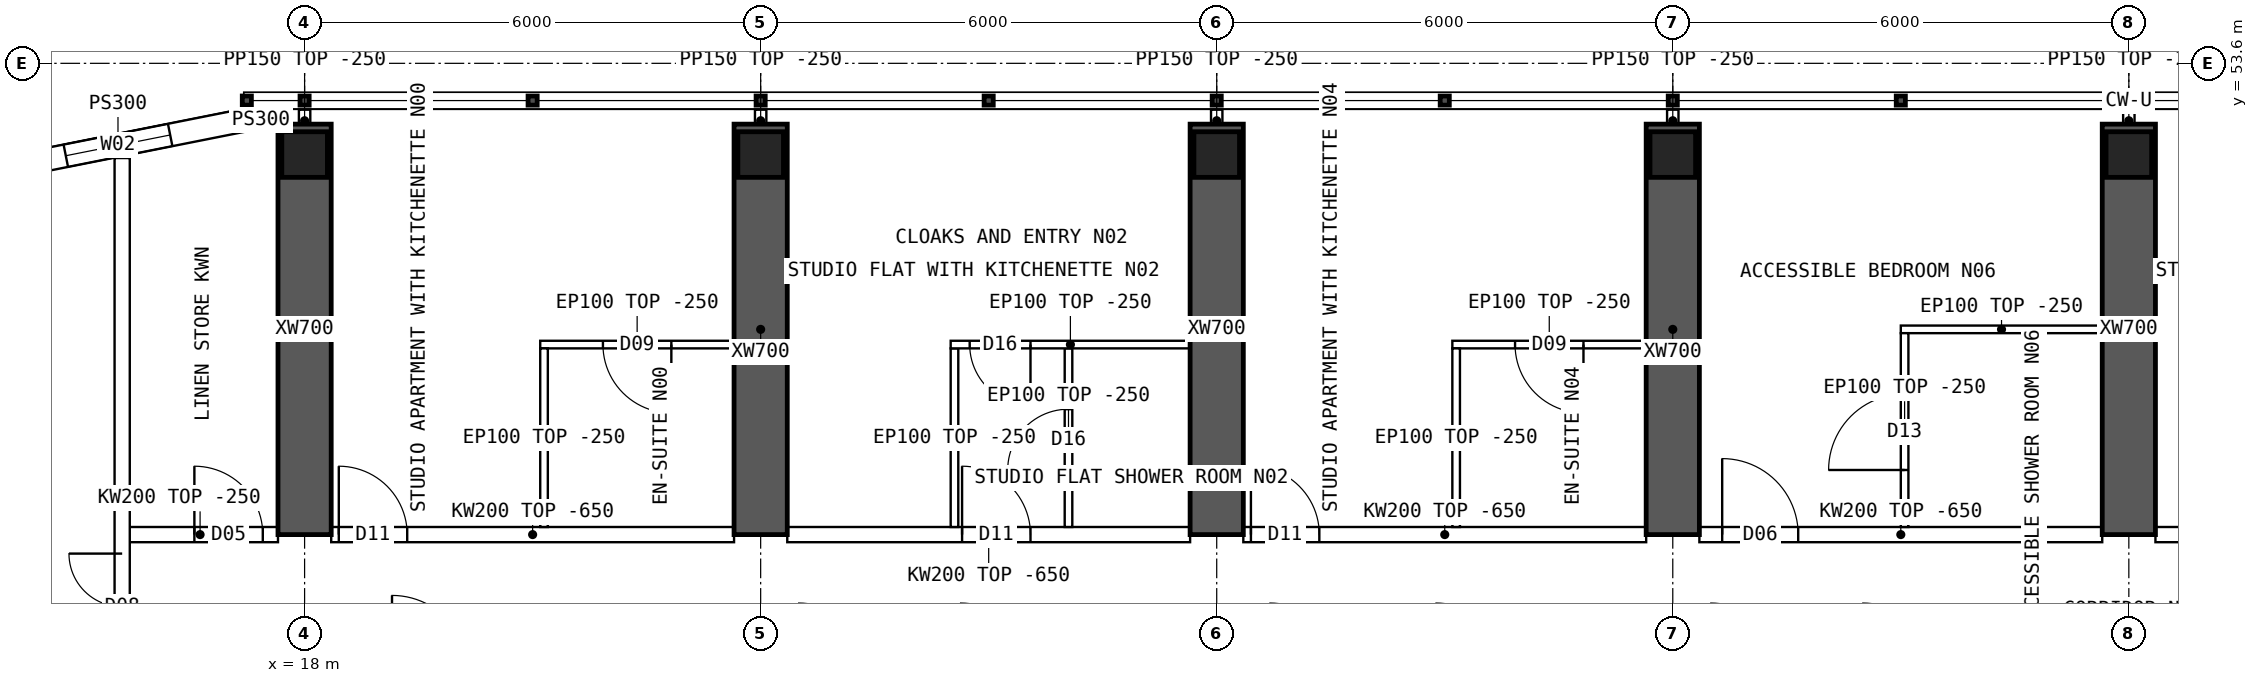
"""IFC4 building model, lengths in metres.
Left out: names, types, materials, properties, quantities, classifications, styles, units other than length and angle.
Written with IfcOpenShell. Run it as: python <this file> out.ifc"""

import sys

from ifc_helpers import new_model, si_unit, direction, frame, frame_2d, origin, origin_2d, place, context, subcontext, project, spatial, polyline, rectangle, hollow_rectangle, outline, extrude, element, fill, save


model = new_model("IFC4")
c1 = context("Model", 3, precision=1e-05, world=origin(), true_north=direction((0.0, 1.0)))
c2 = subcontext(c1, "Body", "Model", "MODEL_VIEW")
j1 = project(units=[si_unit("LENGTHUNIT", "METRE"), si_unit("PLANEANGLEUNIT", "RADIAN")], contexts=[c1])
p1 = place(None, origin())
s1 = spatial("IfcSite", under=j1, at=p1, CompositionType="ELEMENT")
p2 = place(p1, origin())
s2 = spatial("IfcBuilding", under=s1, at=p2, CompositionType="ELEMENT")
p3 = place(p2, frame((0.0, 0.0, 220.3)))
s3 = spatial("IfcBuildingStorey", under=s2, at=p3, CompositionType="ELEMENT", Elevation=220.3)
for number, where, z_axis, x_axis in (
    (1, (18.0, 52.4, 0.0), (0.0, 0.0, 1.0), (1.0, 0.0, 0.0)),
    (2, (24.0, 52.4, 0.0), (0.0, 0.0, 1.0), (1.0, 0.0, 0.0)),
    (3, (30.0, 52.4, 0.0), (0.0, 0.0, 1.0), (1.0, 0.0, 0.0)),
    (4, (36.0, 52.4, 0.0), (0.0, 0.0, 1.0), (1.0, 0.0, 0.0)),
    (5, (42.0, 52.4, 0.0), (0.0, 0.0, 1.0), (1.0, 0.0, 0.0)),
):
    element("IfcColumn", number, at=place(p3, frame(where, z_axis=z_axis, x_axis=x_axis)), inside=s3, PredefinedType="COLUMN", context=c2, shape_type="SweptSolid", body=[
        extrude(hollow_rectangle(XDim=0.6, YDim=0.6, WallThickness=0.06, at=origin_2d()), origin(), (0.0, 0.0, 1.0), 3.75),
    ])
for number, where, z_axis, x_axis in (
    (6, (18.0, 47.4, 0.0), (0.0, 0.0, 1.0), (0.0, 1.0, 0.0)),
    (7, (24.0, 47.4, 0.0), (0.0, 0.0, 1.0), (0.0, 1.0, 0.0)),
    (8, (30.0, 47.4, 0.0), (0.0, 0.0, 1.0), (0.0, 1.0, 0.0)),
    (9, (36.0, 47.4, 0.0), (0.0, 0.0, 1.0), (0.0, 1.0, 0.0)),
    (10, (42.0, 47.4, 0.0), (0.0, 0.0, 1.0), (0.0, 1.0, 0.0)),
):
    element("IfcWall", number, at=place(p3, frame(where, z_axis=z_axis, x_axis=x_axis)), inside=s3, PredefinedType="SHEAR", context=c2, shape_type="SweptSolid", body=[
        extrude(rectangle(XDim=5.4, YDim=0.7, at=frame_2d((2.7, 0.0))), origin(), (0.0, 0.0, 1.0), 3.75),
    ])
p4 = place(p3, frame((17.2, 52.85, 0.0), z_axis=(0.0, 0.0, 1.0), x_axis=(-0.98078325777, -0.195100490205, 0.0)))
e11 = element("IfcWall", 11, at=p4, inside=s3, PredefinedType="SOLIDWALL", context=c2, shape_type="SweptSolid", body=[
    extrude(outline(polyline([(-0.03, -0.15), (3.405, -0.15), (3.345, 0.15), (0.03, 0.15), (-0.03, -0.15)])), origin(), (0.0, 0.0, 1.0), 3.5),
])
p5 = place(p4, frame((0.988, 0.0, 0.9)))
e12 = element("IfcOpeningElement", 12, at=p5, cuts=e11, PredefinedType="OPENING", context=c2, shape_type="SweptSolid", body=[
    extrude(rectangle(XDim=1.4, YDim=1.8, at=frame_2d((0.7, 0.9))), frame((0.0, 0.16, 0.0), z_axis=(0.0, -1.0, 0.0), x_axis=(1.0, 0.0, 0.0)), (0.0, 0.0, 1.0), 0.32),
])
p6 = place(p3, frame((17.2, 52.85, 0.0), z_axis=(0.0, 0.0, 1.0), x_axis=(1.0, 0.0, 0.0)))
e13 = element("IfcWall", 13, at=p6, inside=s3, PredefinedType="SOLIDWALL", context=c2, shape_type="SweptSolid", body=[
    extrude(rectangle(XDim=0.45, YDim=0.3, at=frame_2d((0.225, 0.0))), origin(), (0.0, 0.0, 1.0), 3.5),
])
p7 = place(p3, frame((15.6, 47.4, 0.0), z_axis=(0.0, 0.0, 1.0), x_axis=(1.0, 0.0, 0.0)))
e14 = element("IfcWall", 14, at=p7, inside=s3, PredefinedType="SOLIDWALL", context=c2, shape_type="SweptSolid", body=[
    extrude(rectangle(XDim=2.05, YDim=0.2, at=frame_2d((1.025, 0.0))), origin(), (0.0, 0.0, 1.0), 3.5),
])
p8 = place(p7, frame((0.95, 0.0, 0.0)))
e15 = element("IfcOpeningElement", 15, at=p8, cuts=e14, PredefinedType="OPENING", context=c2, shape_type="SweptSolid", body=[
    extrude(rectangle(XDim=0.9, YDim=2.1, at=frame_2d((0.45, 1.05))), frame((0.0, 0.11, 0.0), z_axis=(0.0, -1.0, 0.0), x_axis=(1.0, 0.0, 0.0)), (0.0, 0.0, 1.0), 0.22),
])
p9 = place(p3, frame((18.35, 47.4, 0.0), z_axis=(0.0, 0.0, 1.0), x_axis=(1.0, 0.0, 0.0)))
e16 = element("IfcWall", 16, at=p9, inside=s3, PredefinedType="SOLIDWALL", context=c2, shape_type="SweptSolid", body=[
    extrude(outline(polyline([(0.0, 0.0), (5.3, 0.0), (5.3, 3.1), (0.0, 3.1), (0.0, 0.0)])), frame((0.0, 0.1, 0.0), z_axis=(0.0, -1.0, 0.0), x_axis=(1.0, 0.0, 0.0)), (0.0, 0.0, 1.0), 0.2),
])
p10 = place(p9, frame((0.1, 0.0, 0.0)))
e17 = element("IfcOpeningElement", 17, at=p10, cuts=e16, PredefinedType="OPENING", context=c2, shape_type="SweptSolid", body=[
    extrude(rectangle(XDim=0.9, YDim=2.1, at=frame_2d((0.45, 1.05))), frame((0.0, 0.11, 0.0), z_axis=(0.0, -1.0, 0.0), x_axis=(1.0, 0.0, 0.0)), (0.0, 0.0, 1.0), 0.22),
])
p11 = place(p3, frame((24.35, 47.4, 0.0), z_axis=(0.0, 0.0, 1.0), x_axis=(1.0, 0.0, 0.0)))
e18 = element("IfcWall", 18, at=p11, inside=s3, PredefinedType="SOLIDWALL", context=c2, shape_type="SweptSolid", body=[
    extrude(outline(polyline([(0.0, 0.0), (5.3, 0.0), (5.3, 3.1), (0.0, 3.1), (0.0, 0.0)])), frame((0.0, 0.1, 0.0), z_axis=(0.0, -1.0, 0.0), x_axis=(1.0, 0.0, 0.0)), (0.0, 0.0, 1.0), 0.2),
])
p12 = place(p11, frame((2.3, 0.0, 0.0)))
e19 = element("IfcOpeningElement", 19, at=p12, cuts=e18, PredefinedType="OPENING", context=c2, shape_type="SweptSolid", body=[
    extrude(rectangle(XDim=0.9, YDim=2.1, at=frame_2d((0.45, 1.05))), frame((0.0, 0.11, 0.0), z_axis=(0.0, -1.0, 0.0), x_axis=(1.0, 0.0, 0.0)), (0.0, 0.0, 1.0), 0.22),
])
p13 = place(p3, frame((30.35, 47.4, 0.0), z_axis=(0.0, 0.0, 1.0), x_axis=(1.0, 0.0, 0.0)))
e20 = element("IfcWall", 20, at=p13, inside=s3, PredefinedType="SOLIDWALL", context=c2, shape_type="SweptSolid", body=[
    extrude(outline(polyline([(0.0, 0.0), (5.3, 0.0), (5.3, 3.1), (0.0, 3.1), (0.0, 0.0)])), frame((0.0, 0.1, 0.0), z_axis=(0.0, -1.0, 0.0), x_axis=(1.0, 0.0, 0.0)), (0.0, 0.0, 1.0), 0.2),
])
p14 = place(p13, frame((0.1, 0.0, 0.0)))
e21 = element("IfcOpeningElement", 21, at=p14, cuts=e20, PredefinedType="OPENING", context=c2, shape_type="SweptSolid", body=[
    extrude(rectangle(XDim=0.9, YDim=2.1, at=frame_2d((0.45, 1.05))), frame((0.0, 0.11, 0.0), z_axis=(0.0, -1.0, 0.0), x_axis=(1.0, 0.0, 0.0)), (0.0, 0.0, 1.0), 0.22),
])
p15 = place(p3, frame((36.35, 47.4, 0.0), z_axis=(0.0, 0.0, 1.0), x_axis=(1.0, 0.0, 0.0)))
e22 = element("IfcWall", 22, at=p15, inside=s3, PredefinedType="SOLIDWALL", context=c2, shape_type="SweptSolid", body=[
    extrude(outline(polyline([(0.0, 0.0), (5.3, 0.0), (5.3, 3.1), (0.0, 3.1), (0.0, 0.0)])), frame((0.0, 0.1, 0.0), z_axis=(0.0, -1.0, 0.0), x_axis=(1.0, 0.0, 0.0)), (0.0, 0.0, 1.0), 0.2),
])
p16 = place(p15, frame((0.3, 0.0, 0.0)))
e23 = element("IfcOpeningElement", 23, at=p16, cuts=e22, PredefinedType="OPENING", context=c2, shape_type="SweptSolid", body=[
    extrude(rectangle(XDim=1.0, YDim=2.1, at=frame_2d((0.5, 1.05))), frame((0.0, 0.11, 0.0), z_axis=(0.0, -1.0, 0.0), x_axis=(1.0, 0.0, 0.0)), (0.0, 0.0, 1.0), 0.22),
])
p17 = place(p3, frame((42.35, 47.4, 0.0), z_axis=(0.0, 0.0, 1.0), x_axis=(1.0, 0.0, 0.0)))
e24 = element("IfcWall", 24, at=p17, inside=s3, PredefinedType="SOLIDWALL", context=c2, shape_type="SweptSolid", body=[
    extrude(outline(polyline([(0.0, 0.0), (5.3, 0.0), (5.3, 3.1), (0.0, 3.1), (0.0, 0.0)])), frame((0.0, 0.1, 0.0), z_axis=(0.0, -1.0, 0.0), x_axis=(1.0, 0.0, 0.0)), (0.0, 0.0, 1.0), 0.2),
])
p18 = place(p17, frame((2.3, 0.0, 0.0)))
e25 = element("IfcOpeningElement", 25, at=p18, cuts=e24, PredefinedType="OPENING", context=c2, shape_type="SweptSolid", body=[
    extrude(rectangle(XDim=0.9, YDim=2.1, at=frame_2d((0.45, 1.05))), frame((0.0, 0.11, 0.0), z_axis=(0.0, -1.0, 0.0), x_axis=(1.0, 0.0, 0.0)), (0.0, 0.0, 1.0), 0.22),
])
p19 = place(p3, frame((21.1, 49.9, 0.0), z_axis=(0.0, 0.0, 1.0), x_axis=(1.0, 0.0, 0.0)))
e26 = element("IfcWall", 26, at=p19, inside=s3, PredefinedType="PARTITIONING", context=c2, shape_type="SweptSolid", body=[
    extrude(rectangle(XDim=2.55, YDim=0.1, at=frame_2d((1.275, 0.0))), origin(), (0.0, 0.0, 1.0), 3.5),
])
p20 = place(p19, frame((0.825, 0.0, 0.0)))
e27 = element("IfcOpeningElement", 27, at=p20, cuts=e26, PredefinedType="OPENING", context=c2, shape_type="SweptSolid", body=[
    extrude(rectangle(XDim=0.9, YDim=2.1, at=frame_2d((0.45, 1.05))), frame((0.0, 0.06, 0.0), z_axis=(0.0, -1.0, 0.0), x_axis=(1.0, 0.0, 0.0)), (0.0, 0.0, 1.0), 0.12),
])
p21 = place(p3, frame((21.15, 49.85, 0.0), z_axis=(0.0, 0.0, 1.0), x_axis=(0.0, -1.0, 0.0)))
e28 = element("IfcWall", 28, at=p21, inside=s3, PredefinedType="PARTITIONING", context=c2, shape_type="SweptSolid", body=[
    extrude(outline(polyline([(0.0, 0.0), (2.35, 0.0), (2.35, 3.1), (2.302, 3.1), (2.3, 3.5), (0.0, 3.5), (0.0, 0.0)])), frame((0.0, 0.05, 0.0), z_axis=(0.0, -1.0, 0.0), x_axis=(1.0, 0.0, 0.0)), (0.0, 0.0, 1.0), 0.1),
])
p22 = place(p3, frame((26.5, 49.9, 0.0), z_axis=(0.0, 0.0, 1.0), x_axis=(1.0, 0.0, 0.0)))
e29 = element("IfcWall", 29, at=p22, inside=s3, PredefinedType="PARTITIONING", context=c2, shape_type="SweptSolid", body=[
    extrude(rectangle(XDim=3.15, YDim=0.1, at=frame_2d((1.575, 0.0))), origin(), (0.0, 0.0, 1.0), 3.5),
])
p23 = place(p22, frame((0.25, 0.0, 0.0)))
e30 = element("IfcOpeningElement", 30, at=p23, cuts=e29, PredefinedType="OPENING", context=c2, shape_type="SweptSolid", body=[
    extrude(rectangle(XDim=0.8, YDim=2.1, at=frame_2d((0.4, 1.05))), frame((0.0, 0.06, 0.0), z_axis=(0.0, -1.0, 0.0), x_axis=(1.0, 0.0, 0.0)), (0.0, 0.0, 1.0), 0.12),
])
p24 = place(p3, frame((26.55, 49.85, 0.0), z_axis=(0.0, 0.0, 1.0), x_axis=(0.0, -1.0, 0.0)))
e31 = element("IfcWall", 31, at=p24, inside=s3, PredefinedType="PARTITIONING", context=c2, shape_type="SweptSolid", body=[
    extrude(outline(polyline([(0.0, 0.0), (2.35, 0.0), (2.35, 3.1), (2.302, 3.1), (2.3, 3.5), (0.0, 3.5), (0.0, 0.0)])), frame((0.0, 0.05, 0.0), z_axis=(0.0, -1.0, 0.0), x_axis=(1.0, 0.0, 0.0)), (0.0, 0.0, 1.0), 0.1),
])
p25 = place(p3, frame((28.05, 49.85, 0.0), z_axis=(0.0, 0.0, 1.0), x_axis=(0.0, -1.0, 0.0)))
e32 = element("IfcWall", 32, at=p25, inside=s3, PredefinedType="PARTITIONING", context=c2, shape_type="SweptSolid", body=[
    extrude(outline(polyline([(0.0, 0.0), (2.35, 0.0), (2.35, 3.1), (2.302, 3.1), (2.3, 3.5), (0.0, 3.5), (0.0, 0.0)])), frame((0.0, 0.05, 0.0), z_axis=(0.0, -1.0, 0.0), x_axis=(1.0, 0.0, 0.0)), (0.0, 0.0, 1.0), 0.1),
])
p26 = place(p25, frame((0.8, 0.0, 0.0)))
e33 = element("IfcOpeningElement", 33, at=p26, cuts=e32, PredefinedType="OPENING", context=c2, shape_type="SweptSolid", body=[
    extrude(rectangle(XDim=0.8, YDim=2.1, at=frame_2d((0.4, 1.05))), frame((0.0, 0.06, 0.0), z_axis=(0.0, -1.0, 0.0), x_axis=(1.0, 0.0, 0.0)), (0.0, 0.0, 1.0), 0.12),
])
p27 = place(p3, frame((33.1, 49.9, 0.0), z_axis=(0.0, 0.0, 1.0), x_axis=(1.0, 0.0, 0.0)))
e34 = element("IfcWall", 34, at=p27, inside=s3, PredefinedType="PARTITIONING", context=c2, shape_type="SweptSolid", body=[
    extrude(rectangle(XDim=2.55, YDim=0.1, at=frame_2d((1.275, 0.0))), origin(), (0.0, 0.0, 1.0), 3.5),
])
p28 = place(p27, frame((0.825, 0.0, 0.0)))
e35 = element("IfcOpeningElement", 35, at=p28, cuts=e34, PredefinedType="OPENING", context=c2, shape_type="SweptSolid", body=[
    extrude(rectangle(XDim=0.9, YDim=2.1, at=frame_2d((0.45, 1.05))), frame((0.0, 0.06, 0.0), z_axis=(0.0, -1.0, 0.0), x_axis=(1.0, 0.0, 0.0)), (0.0, 0.0, 1.0), 0.12),
])
p29 = place(p3, frame((33.15, 49.85, 0.0), z_axis=(0.0, 0.0, 1.0), x_axis=(0.0, -1.0, 0.0)))
e36 = element("IfcWall", 36, at=p29, inside=s3, PredefinedType="PARTITIONING", context=c2, shape_type="SweptSolid", body=[
    extrude(outline(polyline([(0.0, 0.0), (2.35, 0.0), (2.35, 3.1), (2.302, 3.1), (2.3, 3.5), (0.0, 3.5), (0.0, 0.0)])), frame((0.0, 0.05, 0.0), z_axis=(0.0, -1.0, 0.0), x_axis=(1.0, 0.0, 0.0)), (0.0, 0.0, 1.0), 0.1),
])
p30 = place(p3, frame((39.0, 50.1, 0.0), z_axis=(0.0, 0.0, 1.0), x_axis=(1.0, 0.0, 0.0)))
e37 = element("IfcWall", 37, at=p30, inside=s3, PredefinedType="PARTITIONING", context=c2, shape_type="SweptSolid", body=[
    extrude(rectangle(XDim=2.65, YDim=0.1, at=frame_2d((1.325, 0.0))), origin(), (0.0, 0.0, 1.0), 3.5),
])
p31 = place(p3, frame((39.05, 50.05, 0.0), z_axis=(0.0, 0.0, 1.0), x_axis=(0.0, -1.0, 0.0)))
e38 = element("IfcWall", 38, at=p31, inside=s3, PredefinedType="PARTITIONING", context=c2, shape_type="SweptSolid", body=[
    extrude(outline(polyline([(0.0, 0.0), (2.55, 0.0), (2.55, 3.1), (2.502, 3.1), (2.5, 3.5), (0.0, 3.5), (0.0, 0.0)])), frame((0.0, 0.05, 0.0), z_axis=(0.0, -1.0, 0.0), x_axis=(1.0, 0.0, 0.0)), (0.0, 0.0, 1.0), 0.1),
])
p32 = place(p31, frame((0.8, 0.0, 0.0)))
e39 = element("IfcOpeningElement", 39, at=p32, cuts=e38, PredefinedType="OPENING", context=c2, shape_type="SweptSolid", body=[
    extrude(rectangle(XDim=1.0, YDim=2.1, at=frame_2d((0.5, 1.05))), frame((0.0, 0.06, 0.0), z_axis=(0.0, -1.0, 0.0), x_axis=(1.0, 0.0, 0.0)), (0.0, 0.0, 1.0), 0.12),
])
p33 = place(p3, frame((15.6, 11.646, 0.0), z_axis=(0.0, 0.0, 1.0), x_axis=(0.0, 1.0, 0.0)))
e40 = element("IfcWall", 40, at=p33, inside=s3, PredefinedType="SOLIDWALL", context=c2, shape_type="SweptSolid", body=[
    extrude(rectangle(XDim=40.708, YDim=0.2, at=frame_2d((20.354, 0.0))), origin(), (0.0, 0.0, 1.0), 3.5),
])
p34 = place(p33, frame((13.434, 0.0, 0.0)))
e41 = element("IfcOpeningElement", 41, at=p34, cuts=e40, PredefinedType="OPENING", context=c2, shape_type="SweptSolid", body=[
    extrude(rectangle(XDim=1.2, YDim=2.1, at=frame_2d((0.6, 1.05))), frame((0.0, 0.11, 0.0), z_axis=(0.0, -1.0, 0.0), x_axis=(1.0, 0.0, 0.0)), (0.0, 0.0, 1.0), 0.22),
])
p35 = place(p33, frame((5.104, 0.0, 0.0)))
e42 = element("IfcOpeningElement", 42, at=p35, cuts=e40, PredefinedType="OPENING", context=c2, shape_type="SweptSolid", body=[
    extrude(rectangle(XDim=1.4, YDim=2.1, at=frame_2d((0.7, 1.05))), frame((0.0, 0.11, 0.0), z_axis=(0.0, -1.0, 0.0), x_axis=(1.0, 0.0, 0.0)), (0.0, 0.0, 1.0), 0.22),
])
p36 = place(p33, frame((34.104, 0.0, 0.0)))
e43 = element("IfcOpeningElement", 43, at=p36, cuts=e40, PredefinedType="OPENING", context=c2, shape_type="SweptSolid", body=[
    extrude(rectangle(XDim=1.4, YDim=2.1, at=frame_2d((0.7, 1.05))), frame((0.0, 0.11, 0.0), z_axis=(0.0, -1.0, 0.0), x_axis=(1.0, 0.0, 0.0)), (0.0, 0.0, 1.0), 0.22),
])
for number, where, z_axis, x_axis in (
    (44, (18.0, 52.7, 0.0), (0.0, 0.0, 1.0), (0.0, 1.0, 0.0)),
    (45, (24.0, 52.7, 0.0), (0.0, 0.0, 1.0), (0.0, 1.0, 0.0)),
    (46, (30.0, 52.7, 0.0), (0.0, 0.0, 1.0), (0.0, 1.0, 0.0)),
    (47, (36.0, 52.7, 0.0), (0.0, 0.0, 1.0), (0.0, 1.0, 0.0)),
    (48, (42.0, 52.7, 0.0), (0.0, 0.0, 1.0), (0.0, 1.0, 0.0)),
):
    element("IfcWall", number, at=place(p3, frame(where, z_axis=z_axis, x_axis=x_axis)), inside=s3, PredefinedType="PARTITIONING", context=c2, shape_type="SweptSolid", body=[
        extrude(rectangle(XDim=0.29, YDim=0.15, at=frame_2d((0.145, 0.0))), origin(), (0.0, 0.0, 1.0), 3.5),
    ])
p37 = place(p5, origin())
e49 = element("IfcWindow", 49, at=p37, inside=s3, PartitioningType="SINGLE_PANEL", PredefinedType="WINDOW", context=c2, shape_type="SweptSolid", body=[
    extrude(rectangle(XDim=1.4, YDim=1.8, at=frame_2d((0.7, 0.9))), frame((0.0, 0.03, 0.0), z_axis=(0.0, -1.0, 0.0), x_axis=(1.0, 0.0, 0.0)), (0.0, 0.0, 1.0), 0.06),
])
fill(e12, e49)
p38 = place(p20, origin())
e50 = element("IfcDoor", 50, at=p38, inside=s3, OperationType="SINGLE_SWING_RIGHT", PredefinedType="DOOR", context=c2, shape_type="SweptSolid", body=[
    extrude(rectangle(XDim=0.9, YDim=2.1, at=frame_2d((0.45, 1.05))), frame((0.0, 0.025, 0.0), z_axis=(0.0, -1.0, 0.0), x_axis=(1.0, 0.0, 0.0)), (0.0, 0.0, 1.0), 0.05),
])
fill(e27, e50)
p39 = place(p10, origin())
e51 = element("IfcDoor", 51, at=p39, inside=s3, OperationType="SINGLE_SWING_LEFT", PredefinedType="DOOR", context=c2, shape_type="SweptSolid", body=[
    extrude(rectangle(XDim=0.9, YDim=2.1, at=frame_2d((0.45, 1.05))), frame((0.0, 0.025, 0.0), z_axis=(0.0, -1.0, 0.0), x_axis=(1.0, 0.0, 0.0)), (0.0, 0.0, 1.0), 0.05),
])
fill(e17, e51)
p40 = place(p23, origin())
e52 = element("IfcDoor", 52, at=p40, inside=s3, OperationType="SINGLE_SWING_RIGHT", PredefinedType="DOOR", context=c2, shape_type="SweptSolid", body=[
    extrude(rectangle(XDim=0.8, YDim=2.1, at=frame_2d((0.4, 1.05))), frame((0.0, 0.025, 0.0), z_axis=(0.0, -1.0, 0.0), x_axis=(1.0, 0.0, 0.0)), (0.0, 0.0, 1.0), 0.05),
])
fill(e30, e52)
p41 = place(p26, origin())
e53 = element("IfcDoor", 53, at=p41, inside=s3, OperationType="SINGLE_SWING_RIGHT", PredefinedType="DOOR", context=c2, shape_type="SweptSolid", body=[
    extrude(rectangle(XDim=0.8, YDim=2.1, at=frame_2d((0.4, 1.05))), frame((0.0, 0.025, 0.0), z_axis=(0.0, -1.0, 0.0), x_axis=(1.0, 0.0, 0.0)), (0.0, 0.0, 1.0), 0.05),
])
fill(e33, e53)
p42 = place(p12, origin())
e54 = element("IfcDoor", 54, at=p42, inside=s3, OperationType="SINGLE_SWING_LEFT", PredefinedType="DOOR", context=c2, shape_type="SweptSolid", body=[
    extrude(rectangle(XDim=0.9, YDim=2.1, at=frame_2d((0.45, 1.05))), frame((0.0, 0.025, 0.0), z_axis=(0.0, -1.0, 0.0), x_axis=(1.0, 0.0, 0.0)), (0.0, 0.0, 1.0), 0.05),
])
fill(e19, e54)
p43 = place(p28, origin())
e55 = element("IfcDoor", 55, at=p43, inside=s3, OperationType="SINGLE_SWING_RIGHT", PredefinedType="DOOR", context=c2, shape_type="SweptSolid", body=[
    extrude(rectangle(XDim=0.9, YDim=2.1, at=frame_2d((0.45, 1.05))), frame((0.0, 0.025, 0.0), z_axis=(0.0, -1.0, 0.0), x_axis=(1.0, 0.0, 0.0)), (0.0, 0.0, 1.0), 0.05),
])
fill(e35, e55)
p44 = place(p14, origin())
e56 = element("IfcDoor", 56, at=p44, inside=s3, OperationType="SINGLE_SWING_LEFT", PredefinedType="DOOR", context=c2, shape_type="SweptSolid", body=[
    extrude(rectangle(XDim=0.9, YDim=2.1, at=frame_2d((0.45, 1.05))), frame((0.0, 0.025, 0.0), z_axis=(0.0, -1.0, 0.0), x_axis=(1.0, 0.0, 0.0)), (0.0, 0.0, 1.0), 0.05),
])
fill(e21, e56)
p45 = place(p32, origin())
e57 = element("IfcDoor", 57, at=p45, inside=s3, OperationType="SINGLE_SWING_RIGHT", PredefinedType="DOOR", context=c2, shape_type="SweptSolid", body=[
    extrude(rectangle(XDim=1.0, YDim=2.1, at=frame_2d((0.5, 1.05))), frame((0.0, 0.025, 0.0), z_axis=(0.0, -1.0, 0.0), x_axis=(1.0, 0.0, 0.0)), (0.0, 0.0, 1.0), 0.05),
])
fill(e39, e57)
p46 = place(p16, origin())
e58 = element("IfcDoor", 58, at=p46, inside=s3, OperationType="SINGLE_SWING_LEFT", PredefinedType="DOOR", context=c2, shape_type="SweptSolid", body=[
    extrude(rectangle(XDim=1.0, YDim=2.1, at=frame_2d((0.5, 1.05))), frame((0.0, 0.025, 0.0), z_axis=(0.0, -1.0, 0.0), x_axis=(1.0, 0.0, 0.0)), (0.0, 0.0, 1.0), 0.05),
])
fill(e23, e58)
p47 = place(p36, origin())
e59 = element("IfcDoor", 59, at=p47, inside=s3, OperationType="DOUBLE_DOOR_SINGLE_SWING", PredefinedType="DOOR", context=c2, shape_type="SweptSolid", body=[
    extrude(rectangle(XDim=1.4, YDim=2.1, at=frame_2d((0.7, 1.05))), frame((0.0, 0.025, 0.0), z_axis=(0.0, -1.0, 0.0), x_axis=(1.0, 0.0, 0.0)), (0.0, 0.0, 1.0), 0.05),
])
fill(e43, e59)
p48 = place(p8, origin())
e60 = element("IfcDoor", 60, at=p48, inside=s3, OperationType="SINGLE_SWING_LEFT", PredefinedType="DOOR", context=c2, shape_type="SweptSolid", body=[
    extrude(rectangle(XDim=0.9, YDim=2.1, at=frame_2d((0.45, 1.05))), frame((0.0, 0.025, 0.0), z_axis=(0.0, -1.0, 0.0), x_axis=(1.0, 0.0, 0.0)), (0.0, 0.0, 1.0), 0.05),
])
fill(e15, e60)
save(model, sys.argv[1])
